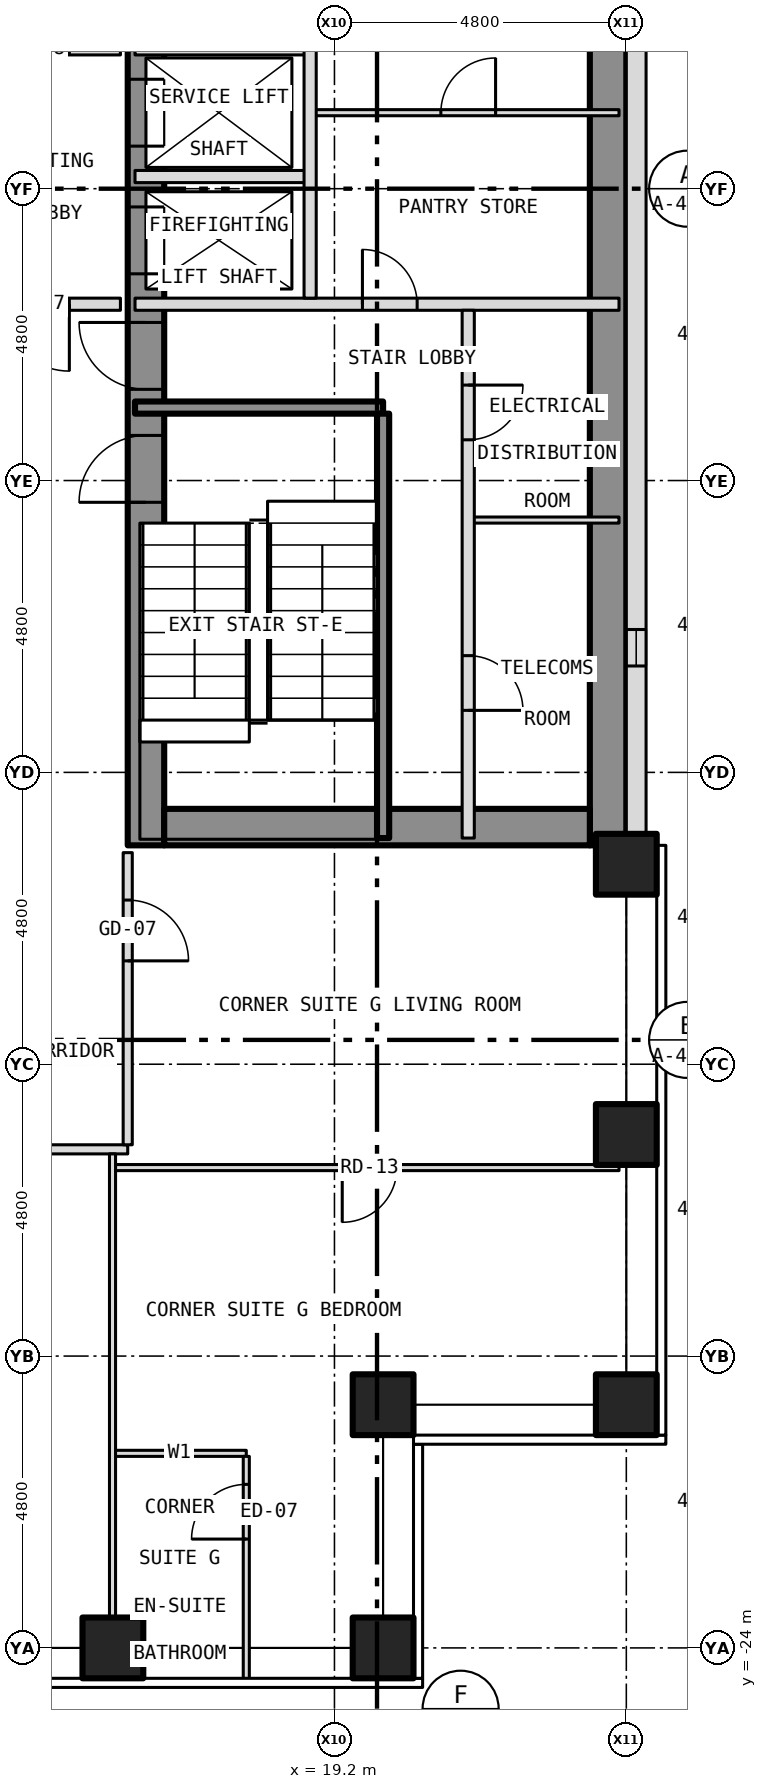
"""IFC4 building model, lengths in metres.
Left out: names, types, materials, properties, quantities, classifications, styles, units other than length and angle.
Written with IfcOpenShell. Run it as: python <this file> out.ifc"""

import sys

from ifc_helpers import new_model, si_unit, direction, frame, frame_2d, origin, origin_2d, place, context, subcontext, project, spatial, rectangle, hollow_rectangle, extrude, element, fill, save


model = new_model("IFC4")
c1 = context("Model", 3, precision=1e-05, world=origin(), true_north=direction((0.0, 1.0)))
c2 = subcontext(c1, "Body", "Model", "MODEL_VIEW")
j1 = project(units=[si_unit("LENGTHUNIT", "METRE"), si_unit("PLANEANGLEUNIT", "RADIAN")], contexts=[c1])
p1 = place(None, origin())
s1 = spatial("IfcSite", under=j1, at=p1, CompositionType="ELEMENT")
p2 = place(p1, origin())
s2 = spatial("IfcBuilding", under=s1, at=p2, CompositionType="ELEMENT")
p3 = place(p2, frame((0.0, 0.0, 63.5)))
s3 = spatial("IfcBuildingStorey", under=s2, at=p3, CompositionType="ELEMENT", Elevation=63.5)
for number, where, z_axis, x_axis in (
    (1, (15.556, -24.0, -0.15), (0.0, 0.0, 1.0), (1.0, 0.0, 0.0)),
    (2, (20.0, -24.0, -0.15), (0.0, 0.0, 1.0), (1.0, 0.0, 0.0)),
    (3, (24.0, -20.0, -0.15), (0.0, 0.0, 1.0), (1.0, 0.0, 0.0)),
    (4, (24.0, -15.556, -0.15), (0.0, 0.0, 1.0), (1.0, 0.0, 0.0)),
    (5, (24.0, -11.111, -0.15), (0.0, 0.0, 1.0), (1.0, 0.0, 0.0)),
    (6, (20.0, -20.0, -0.15), (0.0, 0.0, 1.0), (1.0, 0.0, 0.0)),
):
    element("IfcColumn", number, at=place(p3, frame(where, z_axis=z_axis, x_axis=x_axis)), inside=s3, PredefinedType="COLUMN", context=c2, shape_type="SweptSolid", body=[
        extrude(hollow_rectangle(XDim=1.0, YDim=1.0, WallThickness=0.06, at=origin_2d()), origin(), (0.0, 0.0, 1.0), 3.5),
    ])
p4 = place(p3, frame((16.1, -10.8, 0.0), z_axis=(0.0, 0.0, 1.0), x_axis=(0.0, 1.0, 0.0)))
e7 = element("IfcWall", 7, at=p4, inside=s3, PredefinedType="SHEAR", context=c2, shape_type="SweptSolid", body=[
    extrude(rectangle(XDim=21.6, YDim=0.6, at=frame_2d((10.8, 0.0))), origin(), (0.0, 0.0, 1.0), 3.25),
])
p5 = place(p4, frame((9.4, 0.0, 0.0)))
e8 = element("IfcOpeningElement", 8, at=p5, cuts=e7, PredefinedType="OPENING", context=c2, shape_type="SweptSolid", body=[
    extrude(rectangle(XDim=1.1, YDim=2.1, at=frame_2d((0.55, 1.05))), frame((0.0, 0.312, 0.0), z_axis=(0.0, -1.0, 0.0), x_axis=(1.0, 0.0, 0.0)), (0.0, 0.0, 1.0), 0.624),
])
p6 = place(p4, frame((11.5, 0.0, 0.0)))
e9 = element("IfcOpeningElement", 9, at=p6, cuts=e7, PredefinedType="OPENING", context=c2, shape_type="SweptSolid", body=[
    extrude(rectangle(XDim=1.1, YDim=2.1, at=frame_2d((0.55, 1.05))), frame((0.0, 0.312, 0.0), z_axis=(0.0, -1.0, 0.0), x_axis=(1.0, 0.0, 0.0)), (0.0, 0.0, 1.0), 0.624),
])
p7 = place(p4, frame((13.6, 0.0, 0.0)))
e10 = element("IfcOpeningElement", 10, at=p7, cuts=e7, PredefinedType="OPENING", context=c2, shape_type="SweptSolid", body=[
    extrude(rectangle(XDim=1.1, YDim=2.1, at=frame_2d((0.55, 1.05))), frame((0.0, 0.312, 0.0), z_axis=(0.0, -1.0, 0.0), x_axis=(1.0, 0.0, 0.0)), (0.0, 0.0, 1.0), 0.624),
])
p8 = place(p4, frame((15.7, 0.0, 0.0)))
e11 = element("IfcOpeningElement", 11, at=p8, cuts=e7, PredefinedType="OPENING", context=c2, shape_type="SweptSolid", body=[
    extrude(rectangle(XDim=1.1, YDim=2.1, at=frame_2d((0.55, 1.05))), frame((0.0, 0.312, 0.0), z_axis=(0.0, -1.0, 0.0), x_axis=(1.0, 0.0, 0.0)), (0.0, 0.0, 1.0), 0.624),
])
p9 = place(p4, frame((17.8, 0.0, 0.0)))
e12 = element("IfcOpeningElement", 12, at=p9, cuts=e7, PredefinedType="OPENING", context=c2, shape_type="SweptSolid", body=[
    extrude(rectangle(XDim=1.1, YDim=2.1, at=frame_2d((0.55, 1.05))), frame((0.0, 0.312, 0.0), z_axis=(0.0, -1.0, 0.0), x_axis=(1.0, 0.0, 0.0)), (0.0, 0.0, 1.0), 0.624),
])
p10 = place(p4, frame((5.642, 0.0, 0.0)))
e13 = element("IfcOpeningElement", 13, at=p10, cuts=e7, PredefinedType="OPENING", context=c2, shape_type="SweptSolid", body=[
    extrude(rectangle(XDim=1.1, YDim=2.1, at=frame_2d((0.55, 1.05))), frame((0.0, 0.312, 0.0), z_axis=(0.0, -1.0, 0.0), x_axis=(1.0, 0.0, 0.0)), (0.0, 0.0, 1.0), 0.624),
])
p11 = place(p4, frame((7.5, 0.0, 0.0)))
e14 = element("IfcOpeningElement", 14, at=p11, cuts=e7, PredefinedType="OPENING", context=c2, shape_type="SweptSolid", body=[
    extrude(rectangle(XDim=1.1, YDim=2.1, at=frame_2d((0.55, 1.05))), frame((0.0, 0.312, 0.0), z_axis=(0.0, -1.0, 0.0), x_axis=(1.0, 0.0, 0.0)), (0.0, 0.0, 1.0), 0.624),
])
p12 = place(p3, frame((23.7, -10.8, 0.0), z_axis=(0.0, 0.0, 1.0), x_axis=(0.0, 1.0, 0.0)))
e15 = element("IfcWall", 15, at=p12, inside=s3, PredefinedType="SHEAR", context=c2, shape_type="SweptSolid", body=[
    extrude(rectangle(XDim=21.6, YDim=0.6, at=frame_2d((10.8, 0.0))), origin(), (0.0, 0.0, 1.0), 3.25),
])
p13 = place(p3, frame((16.4, -10.5, 0.0), z_axis=(0.0, 0.0, 1.0), x_axis=(1.0, 0.0, 0.0)))
e16 = element("IfcWall", 16, at=p13, inside=s3, PredefinedType="SHEAR", context=c2, shape_type="SweptSolid", body=[
    extrude(rectangle(XDim=7.0, YDim=0.6, at=frame_2d((3.5, 0.0))), origin(), (0.0, 0.0, 1.0), 3.25),
])
p14 = place(p3, frame((24.163, -10.8, 0.0), z_axis=(0.0, 0.0, 1.0), x_axis=(0.0, 1.0, 0.0)))
e17 = element("IfcWall", 17, at=p14, inside=s3, PredefinedType="SOLIDWALL", context=c2, shape_type="SweptSolid", body=[
    extrude(rectangle(XDim=21.6, YDim=0.325, at=frame_2d((10.8, 0.0))), origin(), (0.0, 0.0, 1.0), 3.5),
])
p15 = place(p14, frame((2.95, 0.0, 1.0)))
e18 = element("IfcOpeningElement", 18, at=p15, cuts=e17, PredefinedType="OPENING", context=c2, shape_type="SweptSolid", body=[
    extrude(rectangle(XDim=0.6, YDim=1.5, at=frame_2d((0.3, 0.75))), frame((0.0, 0.175, 0.0), z_axis=(0.0, -1.0, 0.0), x_axis=(1.0, 0.0, 0.0)), (0.0, 0.0, 1.0), 0.349),
])
p16 = place(p3, frame((15.55, -20.8, 0.0), z_axis=(0.0, 0.0, 1.0), x_axis=(1.0, 0.0, 0.0)))
e19 = element("IfcWall", 19, at=p16, inside=s3, PredefinedType="PARTITIONING", context=c2, shape_type="SweptSolid", body=[
    extrude(rectangle(XDim=2.2, YDim=0.1, at=frame_2d((1.1, 0.0))), origin(), (0.0, 0.0, 1.0), 3.35),
])
p17 = place(p3, frame((15.55, -16.1, 0.0), z_axis=(0.0, 0.0, 1.0), x_axis=(1.0, 0.0, 0.0)))
e20 = element("IfcWall", 20, at=p17, inside=s3, PredefinedType="PARTITIONING", context=c2, shape_type="SweptSolid", body=[
    extrude(rectangle(XDim=8.33, YDim=0.1, at=frame_2d((4.165, 0.0))), origin(), (0.0, 0.0, 1.0), 3.35),
])
p18 = place(p17, frame((3.778, 0.0, 0.0)))
e21 = element("IfcOpeningElement", 21, at=p18, cuts=e20, PredefinedType="OPENING", context=c2, shape_type="SweptSolid", body=[
    extrude(rectangle(XDim=0.9, YDim=2.1, at=frame_2d((0.45, 1.05))), frame((0.0, 0.062, 0.0), z_axis=(0.0, -1.0, 0.0), x_axis=(1.0, 0.0, 0.0)), (0.0, 0.0, 1.0), 0.124),
])
p19 = place(p3, frame((9.15, -15.8, 0.0), z_axis=(0.0, 0.0, 1.0), x_axis=(1.0, 0.0, 0.0)))
e22 = element("IfcWall", 22, at=p19, inside=s3, PredefinedType="PARTITIONING", context=c2, shape_type="SweptSolid", body=[
    extrude(rectangle(XDim=6.65, YDim=0.15, at=frame_2d((3.325, 0.0))), origin(), (0.0, 0.0, 1.0), 3.35),
])
p20 = place(p19, frame((3.803, 0.0, 0.0)))
e23 = element("IfcOpeningElement", 23, at=p20, cuts=e22, PredefinedType="OPENING", context=c2, shape_type="SweptSolid", body=[
    extrude(rectangle(XDim=1.0, YDim=2.1, at=frame_2d((0.5, 1.05))), frame((0.0, 0.087, 0.0), z_axis=(0.0, -1.0, 0.0), x_axis=(1.0, 0.0, 0.0)), (0.0, 0.0, 1.0), 0.174),
])
p21 = place(p3, frame((21.4, -5.45, 0.0), z_axis=(0.0, 0.0, 1.0), x_axis=(1.0, 0.0, 0.0)))
e24 = element("IfcWall", 24, at=p21, inside=s3, PredefinedType="PARTITIONING", context=c2, shape_type="SweptSolid", body=[
    extrude(rectangle(XDim=2.48, YDim=0.1, at=frame_2d((1.24, 0.0))), origin(), (0.0, 0.0, 1.0), 3.25),
])
p22 = place(p3, frame((15.92, -3.6, 0.0), z_axis=(0.0, 0.0, 1.0), x_axis=(1.0, 0.0, 0.0)))
e25 = element("IfcWall", 25, at=p22, inside=s3, PredefinedType="SHEAR", context=c2, shape_type="SweptSolid", body=[
    extrude(rectangle(XDim=4.08, YDim=0.2, at=frame_2d((2.04, 0.0))), origin(), (0.0, 0.0, 1.0), 3.25),
])
p23 = place(p3, frame((12.4, -1.9, 0.0), z_axis=(0.0, 0.0, 1.0), x_axis=(1.0, 0.0, 0.0)))
e26 = element("IfcWall", 26, at=p23, inside=s3, PredefinedType="PARTITIONING", context=c2, shape_type="SweptSolid", body=[
    extrude(rectangle(XDim=3.28, YDim=0.2, at=frame_2d((1.64, 0.0))), origin(), (0.0, 0.0, 1.0), 3.35),
])
p24 = place(p23, frame((1.34, 0.0, 0.0)))
e27 = element("IfcOpeningElement", 27, at=p24, cuts=e26, PredefinedType="OPENING", context=c2, shape_type="SweptSolid", body=[
    extrude(rectangle(XDim=1.1, YDim=2.1, at=frame_2d((0.55, 1.05))), frame((0.0, 0.112, 0.0), z_axis=(0.0, -1.0, 0.0), x_axis=(1.0, 0.0, 0.0)), (0.0, 0.0, 1.0), 0.224),
])
p25 = place(p3, frame((15.92, -1.9, 0.0), z_axis=(0.0, 0.0, 1.0), x_axis=(1.0, 0.0, 0.0)))
e28 = element("IfcWall", 28, at=p25, inside=s3, PredefinedType="PARTITIONING", context=c2, shape_type="SweptSolid", body=[
    extrude(rectangle(XDim=7.96, YDim=0.2, at=frame_2d((3.98, 0.0))), origin(), (0.0, 0.0, 1.0), 3.25),
])
p26 = place(p25, frame((3.74, 0.0, 0.0)))
e29 = element("IfcOpeningElement", 29, at=p26, cuts=e28, PredefinedType="OPENING", context=c2, shape_type="SweptSolid", body=[
    extrude(rectangle(XDim=0.9, YDim=2.1, at=frame_2d((0.45, 1.05))), frame((0.0, 0.112, 0.0), z_axis=(0.0, -1.0, 0.0), x_axis=(1.0, 0.0, 0.0)), (0.0, 0.0, 1.0), 0.224),
])
p27 = place(p3, frame((15.92, 0.2, 0.0), z_axis=(0.0, 0.0, 1.0), x_axis=(1.0, 0.0, 0.0)))
e30 = element("IfcWall", 30, at=p27, inside=s3, PredefinedType="PARTITIONING", context=c2, shape_type="SweptSolid", body=[
    extrude(rectangle(XDim=2.88, YDim=0.2, at=frame_2d((1.44, 0.0))), origin(), (0.0, 0.0, 1.0), 3.25),
])
p28 = place(p3, frame((18.8, 1.25, 0.0), z_axis=(0.0, 0.0, 1.0), x_axis=(1.0, 0.0, 0.0)))
e31 = element("IfcWall", 31, at=p28, inside=s3, PredefinedType="PARTITIONING", context=c2, shape_type="SweptSolid", body=[
    extrude(rectangle(XDim=5.08, YDim=0.1, at=frame_2d((2.54, 0.0))), origin(), (0.0, 0.0, 1.0), 3.25),
])
p29 = place(p28, frame((2.15, 0.0, 0.0)))
e32 = element("IfcOpeningElement", 32, at=p29, cuts=e31, PredefinedType="OPENING", context=c2, shape_type="SweptSolid", body=[
    extrude(rectangle(XDim=0.9, YDim=2.1, at=frame_2d((0.45, 1.05))), frame((0.0, 0.062, 0.0), z_axis=(0.0, -1.0, 0.0), x_axis=(1.0, 0.0, 0.0)), (0.0, 0.0, 1.0), 0.124),
])
p30 = place(p3, frame((12.4, 2.3, 0.0), z_axis=(0.0, 0.0, 1.0), x_axis=(1.0, 0.0, 0.0)))
e33 = element("IfcWall", 33, at=p30, inside=s3, PredefinedType="PARTITIONING", context=c2, shape_type="SweptSolid", body=[
    extrude(rectangle(XDim=3.28, YDim=0.2, at=frame_2d((1.64, 0.0))), origin(), (0.0, 0.0, 1.0), 3.35),
])
p31 = place(p30, frame((1.34, 0.0, 0.0)))
e34 = element("IfcOpeningElement", 34, at=p31, cuts=e33, PredefinedType="OPENING", context=c2, shape_type="SweptSolid", body=[
    extrude(rectangle(XDim=1.1, YDim=2.1, at=frame_2d((0.55, 1.05))), frame((0.0, 0.112, 0.0), z_axis=(0.0, -1.0, 0.0), x_axis=(1.0, 0.0, 0.0)), (0.0, 0.0, 1.0), 0.224),
])
p32 = place(p3, frame((15.92, 2.3, 0.0), z_axis=(0.0, 0.0, 1.0), x_axis=(1.0, 0.0, 0.0)))
e35 = element("IfcWall", 35, at=p32, inside=s3, PredefinedType="PARTITIONING", context=c2, shape_type="SweptSolid", body=[
    extrude(rectangle(XDim=2.88, YDim=0.2, at=frame_2d((1.44, 0.0))), origin(), (0.0, 0.0, 1.0), 3.25),
])
p33 = place(p3, frame((15.55, -23.88, 0.0), z_axis=(0.0, 0.0, 1.0), x_axis=(0.0, 1.0, 0.0)))
e36 = element("IfcWall", 36, at=p33, inside=s3, PredefinedType="PARTITIONING", context=c2, shape_type="SweptSolid", body=[
    extrude(rectangle(XDim=8.005, YDim=0.1, at=frame_2d((4.002, 0.0))), origin(), (0.0, 0.0, 1.0), 3.35),
])
p34 = place(p3, frame((15.8, -15.725, 0.0), z_axis=(0.0, 0.0, 1.0), x_axis=(0.0, 1.0, 0.0)))
e37 = element("IfcWall", 37, at=p34, inside=s3, PredefinedType="PARTITIONING", context=c2, shape_type="SweptSolid", body=[
    extrude(rectangle(XDim=4.805, YDim=0.15, at=frame_2d((2.403, 0.0))), origin(), (0.0, 0.0, 1.0), 3.35),
])
p35 = place(p34, frame((3.025, 0.0, 0.0)))
e38 = element("IfcOpeningElement", 38, at=p35, cuts=e37, PredefinedType="OPENING", context=c2, shape_type="SweptSolid", body=[
    extrude(rectangle(XDim=1.0, YDim=2.1, at=frame_2d((0.5, 1.05))), frame((0.0, 0.087, 0.0), z_axis=(0.0, -1.0, 0.0), x_axis=(1.0, 0.0, 0.0)), (0.0, 0.0, 1.0), 0.174),
])
p36 = place(p3, frame((17.75, -24.53, 0.0), z_axis=(0.0, 0.0, 1.0), x_axis=(0.0, 1.0, 0.0)))
e39 = element("IfcWall", 39, at=p36, inside=s3, PredefinedType="PARTITIONING", context=c2, shape_type="SweptSolid", body=[
    extrude(rectangle(XDim=3.68, YDim=0.1, at=frame_2d((1.84, 0.0))), origin(), (0.0, 0.0, 1.0), 3.35),
])
p37 = place(p36, frame((2.32, 0.0, 0.0)))
e40 = element("IfcOpeningElement", 40, at=p37, cuts=e39, PredefinedType="OPENING", context=c2, shape_type="SweptSolid", body=[
    extrude(rectangle(XDim=0.9, YDim=2.1, at=frame_2d((0.45, 1.05))), frame((0.0, 0.062, 0.0), z_axis=(0.0, -1.0, 0.0), x_axis=(1.0, 0.0, 0.0)), (0.0, 0.0, 1.0), 0.124),
])
p38 = place(p3, frame((18.8, -1.8, 0.0), z_axis=(0.0, 0.0, 1.0), x_axis=(0.0, 1.0, 0.0)))
e41 = element("IfcWall", 41, at=p38, inside=s3, PredefinedType="PARTITIONING", context=c2, shape_type="SweptSolid", body=[
    extrude(rectangle(XDim=12.48, YDim=0.2, at=frame_2d((6.24, 0.0))), origin(), (0.0, 0.0, 1.0), 3.25),
])
p39 = place(p3, frame((20.0, -10.68, 0.0), z_axis=(0.0, 0.0, 1.0), x_axis=(0.0, 1.0, 0.0)))
e42 = element("IfcWall", 42, at=p39, inside=s3, PredefinedType="SHEAR", context=c2, shape_type="SweptSolid", body=[
    extrude(rectangle(XDim=6.98, YDim=0.2, at=frame_2d((3.49, 0.0))), origin(), (0.0, 0.0, 1.0), 3.25),
])
p40 = place(p3, frame((21.4, -10.68, 0.0), z_axis=(0.0, 0.0, 1.0), x_axis=(0.0, 1.0, 0.0)))
e43 = element("IfcWall", 43, at=p40, inside=s3, PredefinedType="PARTITIONING", context=c2, shape_type="SweptSolid", body=[
    extrude(rectangle(XDim=8.68, YDim=0.2, at=frame_2d((4.34, 0.0))), origin(), (0.0, 0.0, 1.0), 3.25),
])
p41 = place(p40, frame((2.1, 0.0, 0.0)))
e44 = element("IfcOpeningElement", 44, at=p41, cuts=e43, PredefinedType="OPENING", context=c2, shape_type="SweptSolid", body=[
    extrude(rectangle(XDim=0.9, YDim=2.1, at=frame_2d((0.45, 1.05))), frame((0.0, 0.112, 0.0), z_axis=(0.0, -1.0, 0.0), x_axis=(1.0, 0.0, 0.0)), (0.0, 0.0, 1.0), 0.224),
])
p42 = place(p40, frame((6.55, 0.0, 0.0)))
e45 = element("IfcOpeningElement", 45, at=p42, cuts=e43, PredefinedType="OPENING", context=c2, shape_type="SweptSolid", body=[
    extrude(rectangle(XDim=0.9, YDim=2.1, at=frame_2d((0.45, 1.05))), frame((0.0, 0.112, 0.0), z_axis=(0.0, -1.0, 0.0), x_axis=(1.0, 0.0, 0.0)), (0.0, 0.0, 1.0), 0.224),
])
p43 = place(p15, origin())
e46 = element("IfcWindow", 46, at=p43, inside=s3, PartitioningType="SINGLE_PANEL", PredefinedType="WINDOW", context=c2, shape_type="SweptSolid", body=[
    extrude(rectangle(XDim=0.6, YDim=1.5, at=frame_2d((0.3, 0.75))), frame((0.0, -0.073, 0.0), z_axis=(0.0, -1.0, 0.0), x_axis=(1.0, 0.0, 0.0)), (0.0, 0.0, 1.0), 0.06),
])
fill(e18, e46)
p44 = place(p5, origin())
e47 = element("IfcDoor", 47, at=p44, inside=s3, OperationType="SLIDING_TO_LEFT", PredefinedType="DOOR", context=c2, shape_type="SweptSolid", body=[
    extrude(rectangle(XDim=1.1, YDim=2.1, at=frame_2d((0.55, 1.05))), frame((0.0, 0.025, 0.0), z_axis=(0.0, -1.0, 0.0), x_axis=(1.0, 0.0, 0.0)), (0.0, 0.0, 1.0), 0.05),
])
fill(e8, e47)
p45 = place(p6, origin())
e48 = element("IfcDoor", 48, at=p45, inside=s3, OperationType="SLIDING_TO_LEFT", PredefinedType="DOOR", context=c2, shape_type="SweptSolid", body=[
    extrude(rectangle(XDim=1.1, YDim=2.1, at=frame_2d((0.55, 1.05))), frame((0.0, 0.025, 0.0), z_axis=(0.0, -1.0, 0.0), x_axis=(1.0, 0.0, 0.0)), (0.0, 0.0, 1.0), 0.05),
])
fill(e9, e48)
p46 = place(p10, origin())
e49 = element("IfcDoor", 49, at=p46, inside=s3, OperationType="SINGLE_SWING_LEFT", PredefinedType="DOOR", context=c2, shape_type="SweptSolid", body=[
    extrude(rectangle(XDim=1.1, YDim=2.1, at=frame_2d((0.55, 1.05))), frame((0.0, 0.025, 0.0), z_axis=(0.0, -1.0, 0.0), x_axis=(1.0, 0.0, 0.0)), (0.0, 0.0, 1.0), 0.05),
])
fill(e13, e49)
p47 = place(p11, origin())
e50 = element("IfcDoor", 50, at=p47, inside=s3, OperationType="SINGLE_SWING_RIGHT", PredefinedType="DOOR", context=c2, shape_type="SweptSolid", body=[
    extrude(rectangle(XDim=1.1, YDim=2.1, at=frame_2d((0.55, 1.05))), frame((0.0, 0.025, 0.0), z_axis=(0.0, -1.0, 0.0), x_axis=(1.0, 0.0, 0.0)), (0.0, 0.0, 1.0), 0.05),
])
fill(e14, e50)
p48 = place(p41, origin())
e51 = element("IfcDoor", 51, at=p48, inside=s3, OperationType="SINGLE_SWING_LEFT", PredefinedType="DOOR", context=c2, shape_type="SweptSolid", body=[
    extrude(rectangle(XDim=0.9, YDim=2.1, at=frame_2d((0.45, 1.05))), frame((0.0, 0.025, 0.0), z_axis=(0.0, -1.0, 0.0), x_axis=(1.0, 0.0, 0.0)), (0.0, 0.0, 1.0), 0.05),
])
fill(e44, e51)
p49 = place(p42, origin())
e52 = element("IfcDoor", 52, at=p49, inside=s3, OperationType="SINGLE_SWING_RIGHT", PredefinedType="DOOR", context=c2, shape_type="SweptSolid", body=[
    extrude(rectangle(XDim=0.9, YDim=2.1, at=frame_2d((0.45, 1.05))), frame((0.0, 0.025, 0.0), z_axis=(0.0, -1.0, 0.0), x_axis=(1.0, 0.0, 0.0)), (0.0, 0.0, 1.0), 0.05),
])
fill(e45, e52)
p50 = place(p26, origin())
e53 = element("IfcDoor", 53, at=p50, inside=s3, OperationType="SINGLE_SWING_LEFT", PredefinedType="DOOR", context=c2, shape_type="SweptSolid", body=[
    extrude(rectangle(XDim=0.9, YDim=2.1, at=frame_2d((0.45, 1.05))), frame((0.0, 0.025, 0.0), z_axis=(0.0, -1.0, 0.0), x_axis=(1.0, 0.0, 0.0)), (0.0, 0.0, 1.0), 0.05),
])
fill(e29, e53)
p51 = place(p29, origin())
e54 = element("IfcDoor", 54, at=p51, inside=s3, OperationType="SINGLE_SWING_RIGHT", PredefinedType="DOOR", context=c2, shape_type="SweptSolid", body=[
    extrude(rectangle(XDim=0.9, YDim=2.1, at=frame_2d((0.45, 1.05))), frame((0.0, 0.025, 0.0), z_axis=(0.0, -1.0, 0.0), x_axis=(1.0, 0.0, 0.0)), (0.0, 0.0, 1.0), 0.05),
])
fill(e32, e54)
p52 = place(p24, origin())
e55 = element("IfcDoor", 55, at=p52, inside=s3, OperationType="SINGLE_SWING_RIGHT", PredefinedType="DOOR", context=c2, shape_type="SweptSolid", body=[
    extrude(rectangle(XDim=1.1, YDim=2.1, at=frame_2d((0.55, 1.05))), frame((0.0, 0.025, 0.0), z_axis=(0.0, -1.0, 0.0), x_axis=(1.0, 0.0, 0.0)), (0.0, 0.0, 1.0), 0.05),
])
fill(e27, e55)
p53 = place(p35, origin())
e56 = element("IfcDoor", 56, at=p53, inside=s3, OperationType="SINGLE_SWING_LEFT", PredefinedType="DOOR", context=c2, shape_type="SweptSolid", body=[
    extrude(rectangle(XDim=1.0, YDim=2.1, at=frame_2d((0.5, 1.05))), frame((0.0, 0.025, 0.0), z_axis=(0.0, -1.0, 0.0), x_axis=(1.0, 0.0, 0.0)), (0.0, 0.0, 1.0), 0.05),
])
fill(e38, e56)
p54 = place(p18, origin())
e57 = element("IfcDoor", 57, at=p54, inside=s3, OperationType="SINGLE_SWING_LEFT", PredefinedType="DOOR", context=c2, shape_type="SweptSolid", body=[
    extrude(rectangle(XDim=0.9, YDim=2.1, at=frame_2d((0.45, 1.05))), frame((0.0, 0.025, 0.0), z_axis=(0.0, -1.0, 0.0), x_axis=(1.0, 0.0, 0.0)), (0.0, 0.0, 1.0), 0.05),
])
fill(e21, e57)
p55 = place(p37, origin())
e58 = element("IfcDoor", 58, at=p55, inside=s3, OperationType="SINGLE_SWING_LEFT", PredefinedType="DOOR", context=c2, shape_type="SweptSolid", body=[
    extrude(rectangle(XDim=0.9, YDim=2.1, at=frame_2d((0.45, 1.05))), frame((0.0, 0.025, 0.0), z_axis=(0.0, -1.0, 0.0), x_axis=(1.0, 0.0, 0.0)), (0.0, 0.0, 1.0), 0.05),
])
fill(e40, e58)
save(model, sys.argv[1])
